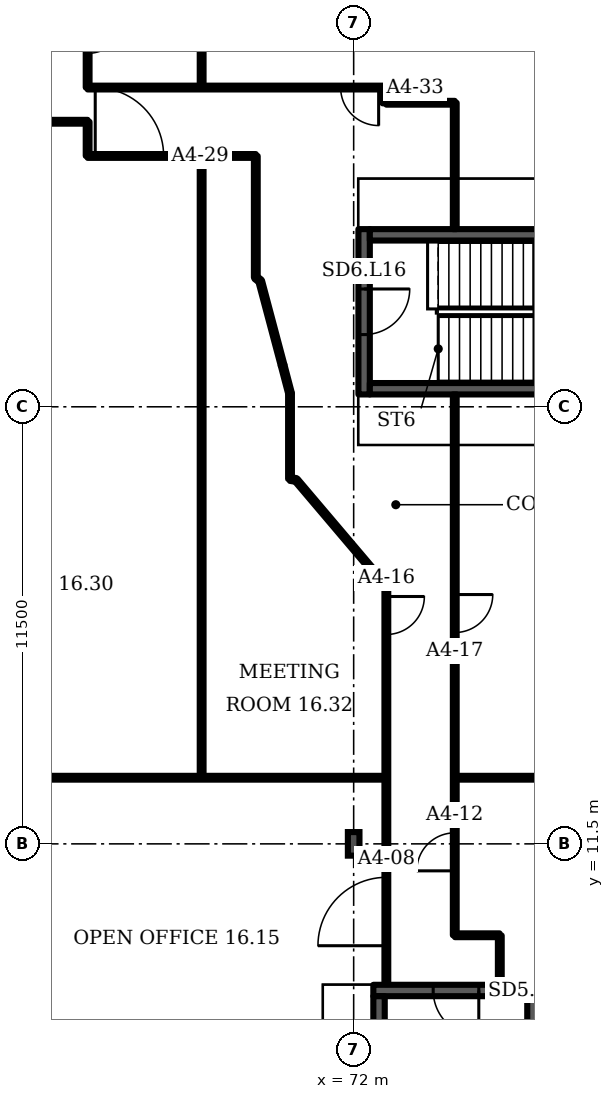
"""IFC4 building model, lengths in metres.
Left out: names, types, materials, properties, quantities, classifications, styles, units other than length and angle.
Written with IfcOpenShell. Run it as: python <this file> out.ifc"""

import sys

from ifc_helpers import new_model, si_unit, direction, frame, frame_2d, origin, origin_2d, place, context, subcontext, project, spatial, rectangle, i_section, extrude, element, fill, save


model = new_model("IFC4")
c1 = context("Model", 3, precision=1e-05, world=origin(), true_north=direction((0.0, 1.0)))
c2 = subcontext(c1, "Body", "Model", "MODEL_VIEW")
j1 = project(units=[si_unit("LENGTHUNIT", "METRE"), si_unit("PLANEANGLEUNIT", "RADIAN")], contexts=[c1])
p1 = place(None, origin())
s1 = spatial("IfcSite", under=j1, at=p1, CompositionType="ELEMENT")
p2 = place(p1, origin())
s2 = spatial("IfcBuilding", under=s1, at=p2, CompositionType="ELEMENT")
p3 = place(p2, frame((0.0, 0.0, 77.5)))
s3 = spatial("IfcBuildingStorey", under=s2, at=p3, CompositionType="ELEMENT", Elevation=77.5)
p4 = place(p3, frame((72.0, 11.5, 0.0), z_axis=(0.0, 0.0, 1.0), x_axis=(1.0, 0.0, 0.0)))
e1 = element("IfcColumn", 1, at=p4, inside=s3, PredefinedType="COLUMN", context=c2, shape_type="SweptSolid", body=[
    extrude(i_section(OverallWidth=0.305, OverallDepth=0.62, WebThickness=0.021, FlangeThickness=0.04, FilletRadius=0.027, at=origin_2d()), origin(), (0.0, 0.0, 1.0), 3.6),
])
p5 = place(p3, frame((72.518, 7.642, 0.0), z_axis=(0.0, 0.0, 1.0), x_axis=(1.0, 0.0, 0.0)))
e2 = element("IfcWall", 2, at=p5, inside=s3, PredefinedType="SHEAR", context=c2, shape_type="SweptSolid", body=[
    extrude(rectangle(XDim=4.35, YDim=0.3, at=frame_2d((2.175, 0.0))), origin(), (0.0, 0.0, 1.0), 3.2),
])
p6 = place(p5, frame((1.575, 0.0, 0.0)))
e3 = element("IfcOpeningElement", 3, at=p6, cuts=e2, PredefinedType="OPENING", context=c2, shape_type="SweptSolid", body=[
    extrude(rectangle(XDim=1.2, YDim=2.1, at=frame_2d((0.6, 1.05))), frame((0.0, 0.16, 0.0), z_axis=(0.0, -1.0, 0.0), x_axis=(1.0, 0.0, 0.0)), (0.0, 0.0, 1.0), 0.32),
])
p7 = place(p3, frame((72.275, 23.325, 0.0), z_axis=(0.0, 0.0, 1.0), x_axis=(0.0, 1.0, 0.0)))
e4 = element("IfcWall", 4, at=p7, inside=s3, PredefinedType="SHEAR", context=c2, shape_type="SweptSolid", body=[
    extrude(rectangle(XDim=4.35, YDim=0.3, at=frame_2d((2.175, 0.0))), origin(), (0.0, 0.0, 1.0), 3.2),
])
p8 = place(p7, frame((1.575, 0.0, 0.0)))
e5 = element("IfcOpeningElement", 5, at=p8, cuts=e4, PredefinedType="OPENING", context=c2, shape_type="SweptSolid", body=[
    extrude(rectangle(XDim=1.2, YDim=2.1, at=frame_2d((0.6, 1.05))), frame((0.0, 0.16, 0.0), z_axis=(0.0, -1.0, 0.0), x_axis=(1.0, 0.0, 0.0)), (0.0, 0.0, 1.0), 0.32),
])
p9 = place(p3, frame((45.3, 13.24, 0.0), z_axis=(0.0, 0.0, 1.0), x_axis=(1.0, 0.0, 0.0)))
e6 = element("IfcWall", 6, at=p9, inside=s3, PredefinedType="PARTITIONING", context=c2, shape_type="SweptSolid", body=[
    extrude(rectangle(XDim=27.56, YDim=0.1, at=frame_2d((13.78, 0.0))), origin(), (0.0, 0.0, 1.0), 3.2),
])
p10 = place(p3, frame((45.3, 30.5, 0.0), z_axis=(0.0, 0.0, 1.0), x_axis=(1.0, 0.0, 0.0)))
e7 = element("IfcWall", 7, at=p10, inside=s3, PredefinedType="PARTITIONING", context=c2, shape_type="SweptSolid", body=[
    extrude(rectangle(XDim=19.7, YDim=0.1, at=frame_2d((9.85, 0.0))), origin(), (0.0, 0.0, 1.0), 3.2),
])
p11 = place(p3, frame((65.0, 29.6, 0.0), z_axis=(0.0, 0.0, 1.0), x_axis=(0.0, 1.0, 0.0)))
e8 = element("IfcWall", 8, at=p11, inside=s3, PredefinedType="PARTITIONING", context=c2, shape_type="SweptSolid", body=[
    extrude(rectangle(XDim=0.9, YDim=0.1, at=frame_2d((0.45, 0.0))), origin(), (0.0, 0.0, 1.0), 3.2),
])
p12 = place(p3, frame((65.0, 29.6, 0.0), z_axis=(0.0, 0.0, 1.0), x_axis=(1.0, 0.0, 0.0)))
e9 = element("IfcWall", 9, at=p12, inside=s3, PredefinedType="PARTITIONING", context=c2, shape_type="SweptSolid", body=[
    extrude(rectangle(XDim=4.425, YDim=0.1, at=frame_2d((2.212, 0.0))), origin(), (0.0, 0.0, 1.0), 3.2),
])
p13 = place(p12, frame((0.2, 0.0, 0.0)))
e10 = element("IfcOpeningElement", 10, at=p13, cuts=e9, PredefinedType="OPENING", context=c2, shape_type="SweptSolid", body=[
    extrude(rectangle(XDim=1.8, YDim=2.1, at=frame_2d((0.9, 1.05))), frame((0.0, 0.06, 0.0), z_axis=(0.0, -1.0, 0.0), x_axis=(1.0, 0.0, 0.0)), (0.0, 0.0, 1.0), 0.12),
])
p14 = place(p3, frame((65.0, 31.4, 0.0), z_axis=(0.0, 0.0, 1.0), x_axis=(0.0, 1.0, 0.0)))
e11 = element("IfcWall", 11, at=p14, inside=s3, PredefinedType="PARTITIONING", context=c2, shape_type="SweptSolid", body=[
    extrude(rectangle(XDim=2.58, YDim=0.1, at=frame_2d((1.29, 0.0))), origin(), (0.0, 0.0, 1.0), 3.2),
])
p15 = place(p14, frame((0.9, 0.0, 0.0)))
e12 = element("IfcOpeningElement", 12, at=p15, cuts=e11, PredefinedType="OPENING", context=c2, shape_type="SweptSolid", body=[
    extrude(rectangle(XDim=1.0, YDim=2.1, at=frame_2d((0.5, 1.05))), frame((0.0, 0.06, 0.0), z_axis=(0.0, -1.0, 0.0), x_axis=(1.0, 0.0, 0.0)), (0.0, 0.0, 1.0), 0.12),
])
p16 = place(p3, frame((65.0, 31.4, 0.0), z_axis=(0.0, 0.0, 1.0), x_axis=(1.0, 0.0, 0.0)))
e13 = element("IfcWall", 13, at=p16, inside=s3, PredefinedType="PARTITIONING", context=c2, shape_type="SweptSolid", body=[
    extrude(rectangle(XDim=7.81, YDim=0.1, at=frame_2d((3.905, 0.0))), origin(), (0.0, 0.0, 1.0), 3.2),
])
p17 = place(p16, frame((6.657, 0.0, 0.0)))
e14 = element("IfcOpeningElement", 14, at=p17, cuts=e13, PredefinedType="OPENING", context=c2, shape_type="SweptSolid", body=[
    extrude(rectangle(XDim=1.0, YDim=2.1, at=frame_2d((0.5, 1.05))), frame((0.0, 0.06, 0.0), z_axis=(0.0, -1.0, 0.0), x_axis=(1.0, 0.0, 0.0)), (0.0, 0.0, 1.0), 0.12),
])
p18 = place(p3, frame((68.0, 13.24, 0.0), z_axis=(0.0, 0.0, 1.0), x_axis=(0.0, 1.0, 0.0)))
e15 = element("IfcWall", 15, at=p18, inside=s3, PredefinedType="PARTITIONING", context=c2, shape_type="SweptSolid", body=[
    extrude(rectangle(XDim=16.36, YDim=0.1, at=frame_2d((8.18, 0.0))), origin(), (0.0, 0.0, 1.0), 3.2),
])
p19 = place(p3, frame((68.0, 31.4, 0.0), z_axis=(0.0, 0.0, 1.0), x_axis=(0.0, 1.0, 0.0)))
e16 = element("IfcWall", 16, at=p19, inside=s3, PredefinedType="PARTITIONING", context=c2, shape_type="SweptSolid", body=[
    extrude(rectangle(XDim=8.39, YDim=0.1, at=frame_2d((4.195, 0.0))), origin(), (0.0, 0.0, 1.0), 3.2),
])
p20 = place(p3, frame((69.425, 26.4, 0.0), z_axis=(0.0, 0.0, 1.0), x_axis=(0.0, 1.0, 0.0)))
e17 = element("IfcWall", 17, at=p20, inside=s3, PredefinedType="PARTITIONING", context=c2, shape_type="SweptSolid", body=[
    extrude(rectangle(XDim=3.2, YDim=0.1, at=frame_2d((1.6, 0.0))), origin(), (0.0, 0.0, 1.0), 3.2),
])
p21 = place(p3, frame((69.54, 26.31, 0.0), z_axis=(0.0, 0.0, 1.0), x_axis=(-0.787997, 0.615675, 0.0)))
e18 = element("IfcWall", 18, at=p21, inside=s3, PredefinedType="PARTITIONING", context=c2, shape_type="SweptSolid", body=[
    extrude(rectangle(XDim=0.146, YDim=0.1, at=frame_2d((0.073, 0.0))), origin(), (0.0, 0.0, 1.0), 3.2),
])
p22 = place(p3, frame((70.13, 24.095, 0.0), z_axis=(0.0, 0.0, 1.0), x_axis=(-0.257318, 0.966327, 0.0)))
e19 = element("IfcWall", 19, at=p22, inside=s3, PredefinedType="PARTITIONING", context=c2, shape_type="SweptSolid", body=[
    extrude(rectangle(XDim=2.292, YDim=0.1, at=frame_2d((1.146, 0.0))), origin(), (0.0, 0.0, 1.0), 3.2),
])
p23 = place(p3, frame((70.325, 21.1, 0.0), z_axis=(0.0, 0.0, 1.0), x_axis=(0.0, 1.0, 0.0)))
e20 = element("IfcWall", 20, at=p23, inside=s3, PredefinedType="PARTITIONING", context=c2, shape_type="SweptSolid", body=[
    extrude(rectangle(XDim=2.255, YDim=0.1, at=frame_2d((1.127, 0.0))), origin(), (0.0, 0.0, 1.0), 3.2),
])
p24 = place(p3, frame((70.325, 23.355, 0.0), z_axis=(0.0, 0.0, 1.0), x_axis=(-0.254901, 0.966965, 0.0)))
e21 = element("IfcWall", 21, at=p24, inside=s3, PredefinedType="PARTITIONING", context=c2, shape_type="SweptSolid", body=[
    extrude(rectangle(XDim=0.765, YDim=0.1, at=frame_2d((0.383, 0.0))), origin(), (0.0, 0.0, 1.0), 3.2),
])
p25 = place(p3, frame((70.485, 21.075, 0.0), z_axis=(0.0, 0.0, 1.0), x_axis=(-0.987098, 0.160112, 0.0)))
e22 = element("IfcWall", 22, at=p25, inside=s3, PredefinedType="PARTITIONING", context=c2, shape_type="SweptSolid", body=[
    extrude(rectangle(XDim=0.157, YDim=0.1, at=frame_2d((0.079, 0.0))), origin(), (0.0, 0.0, 1.0), 3.2),
])
p26 = place(p3, frame((72.81, 30.985, 0.0), z_axis=(0.0, 0.0, 1.0), x_axis=(0.0, 1.0, 0.0)))
e23 = element("IfcWall", 23, at=p26, inside=s3, PredefinedType="PARTITIONING", context=c2, shape_type="SweptSolid", body=[
    extrude(rectangle(XDim=0.415, YDim=0.1, at=frame_2d((0.208, 0.0))), origin(), (0.0, 0.0, 1.0), 3.2),
])
p27 = place(p3, frame((72.86, 7.812, 0.0), z_axis=(0.0, 0.0, 1.0), x_axis=(0.0, 1.0, 0.0)))
e24 = element("IfcWall", 24, at=p27, inside=s3, PredefinedType="PARTITIONING", context=c2, shape_type="SweptSolid", body=[
    extrude(rectangle(XDim=10.463, YDim=0.1, at=frame_2d((5.231, 0.0))), origin(), (0.0, 0.0, 1.0), 3.2),
])
p28 = place(p27, frame((1.008, 0.0, 0.0)))
e25 = element("IfcOpeningElement", 25, at=p28, cuts=e24, PredefinedType="OPENING", context=c2, shape_type="SweptSolid", body=[
    extrude(rectangle(XDim=1.8, YDim=2.1, at=frame_2d((0.9, 1.05))), frame((0.0, 0.06, 0.0), z_axis=(0.0, -1.0, 0.0), x_axis=(1.0, 0.0, 0.0)), (0.0, 0.0, 1.0), 0.12),
])
p29 = place(p27, frame((9.197, 0.0, 0.0)))
e26 = element("IfcOpeningElement", 26, at=p29, cuts=e24, PredefinedType="OPENING", context=c2, shape_type="SweptSolid", body=[
    extrude(rectangle(XDim=1.0, YDim=2.1, at=frame_2d((0.5, 1.05))), frame((0.0, 0.06, 0.0), z_axis=(0.0, -1.0, 0.0), x_axis=(1.0, 0.0, 0.0)), (0.0, 0.0, 1.0), 0.12),
])
p30 = place(p3, frame((72.86, 31.0, 0.0), z_axis=(0.0, 0.0, 1.0), x_axis=(1.0, 0.0, 0.0)))
e27 = element("IfcWall", 27, at=p30, inside=s3, PredefinedType="PARTITIONING", context=c2, shape_type="SweptSolid", body=[
    extrude(rectangle(XDim=1.8, YDim=0.1, at=frame_2d((0.9, 0.0))), origin(), (0.0, 0.0, 1.0), 3.2),
])
p31 = place(p3, frame((72.86, 18.275, 0.0), z_axis=(0.0, 0.0, 1.0), x_axis=(-0.646848, 0.762613, 0.0)))
e28 = element("IfcWall", 28, at=p31, inside=s3, PredefinedType="PARTITIONING", context=c2, shape_type="SweptSolid", body=[
    extrude(rectangle(XDim=3.672, YDim=0.1, at=frame_2d((1.836, 0.0))), origin(), (0.0, 0.0, 1.0), 3.2),
])
p32 = place(p3, frame((74.66, 9.095, 0.0), z_axis=(0.0, 0.0, 1.0), x_axis=(0.0, 1.0, 0.0)))
e29 = element("IfcWall", 29, at=p32, inside=s3, PredefinedType="PARTITIONING", context=c2, shape_type="SweptSolid", body=[
    extrude(rectangle(XDim=14.23, YDim=0.1, at=frame_2d((7.115, 0.0))), origin(), (0.0, 0.0, 1.0), 3.2),
])
p33 = place(p32, frame((1.695, 0.0, 0.0)))
e30 = element("IfcOpeningElement", 30, at=p33, cuts=e29, PredefinedType="OPENING", context=c2, shape_type="SweptSolid", body=[
    extrude(rectangle(XDim=1.0, YDim=2.1, at=frame_2d((0.5, 1.05))), frame((0.0, 0.06, 0.0), z_axis=(0.0, -1.0, 0.0), x_axis=(1.0, 0.0, 0.0)), (0.0, 0.0, 1.0), 0.12),
])
p34 = place(p32, frame((7.965, 0.0, 0.0)))
e31 = element("IfcOpeningElement", 31, at=p34, cuts=e29, PredefinedType="OPENING", context=c2, shape_type="SweptSolid", body=[
    extrude(rectangle(XDim=1.0, YDim=2.1, at=frame_2d((0.5, 1.05))), frame((0.0, 0.06, 0.0), z_axis=(0.0, -1.0, 0.0), x_axis=(1.0, 0.0, 0.0)), (0.0, 0.0, 1.0), 0.12),
])
p35 = place(p3, frame((74.66, 27.675, 0.0), z_axis=(0.0, 0.0, 1.0), x_axis=(0.0, 1.0, 0.0)))
e32 = element("IfcWall", 32, at=p35, inside=s3, PredefinedType="PARTITIONING", context=c2, shape_type="SweptSolid", body=[
    extrude(rectangle(XDim=3.325, YDim=0.1, at=frame_2d((1.663, 0.0))), origin(), (0.0, 0.0, 1.0), 3.2),
])
p36 = place(p3, frame((74.665, 9.095, 0.0), z_axis=(0.0, 0.0, 1.0), x_axis=(1.0, 0.0, 0.0)))
e33 = element("IfcWall", 33, at=p36, inside=s3, PredefinedType="PARTITIONING", context=c2, shape_type="SweptSolid", body=[
    extrude(rectangle(XDim=1.175, YDim=0.1, at=frame_2d((0.587, 0.0))), origin(), (0.0, 0.0, 1.0), 3.2),
])
p37 = place(p3, frame((74.665, 13.24, 0.0), z_axis=(0.0, 0.0, 1.0), x_axis=(1.0, 0.0, 0.0)))
e34 = element("IfcWall", 34, at=p37, inside=s3, PredefinedType="PARTITIONING", context=c2, shape_type="SweptSolid", body=[
    extrude(rectangle(XDim=11.7, YDim=0.1, at=frame_2d((5.85, 0.0))), origin(), (0.0, 0.0, 1.0), 3.2),
])
p38 = place(p3, frame((75.845, 7.812, 0.0), z_axis=(0.0, 0.0, 1.0), x_axis=(0.0, 1.0, 0.0)))
e35 = element("IfcWall", 35, at=p38, inside=s3, PredefinedType="PARTITIONING", context=c2, shape_type="SweptSolid", body=[
    extrude(rectangle(XDim=1.278, YDim=0.1, at=frame_2d((0.639, 0.0))), origin(), (0.0, 0.0, 1.0), 3.2),
])
for number, where, z_axis, x_axis in (
    (36, (72.667, -0.008, 0.0), (0.0, 0.0, 1.0), (0.0, 1.0, 0.0)),
    (37, (76.718, -0.008, 0.0), (0.0, 0.0, 1.0), (0.0, 1.0, 0.0)),
    (38, (72.425, 23.475, 0.0), (0.0, 0.0, 1.0), (1.0, 0.0, 0.0)),
    (39, (72.425, 27.525, 0.0), (0.0, 0.0, 1.0), (1.0, 0.0, 0.0)),
):
    element("IfcWall", number, at=place(p3, frame(where, z_axis=z_axis, x_axis=x_axis)), inside=s3, PredefinedType="SHEAR", context=c2, shape_type="SweptSolid", body=[
        extrude(rectangle(XDim=7.5, YDim=0.3, at=frame_2d((3.75, 0.0))), origin(), (0.0, 0.0, 1.0), 3.2),
    ])
p39 = place(p6, origin())
e40 = element("IfcDoor", 40, at=p39, inside=s3, OperationType="SINGLE_SWING_RIGHT", PredefinedType="DOOR", context=c2, shape_type="SweptSolid", body=[
    extrude(rectangle(XDim=1.2, YDim=2.1, at=frame_2d((0.6, 1.05))), frame((0.0, 0.025, 0.0), z_axis=(0.0, -1.0, 0.0), x_axis=(1.0, 0.0, 0.0)), (0.0, 0.0, 1.0), 0.05),
])
fill(e3, e40)
p40 = place(p8, origin())
e41 = element("IfcDoor", 41, at=p40, inside=s3, OperationType="SINGLE_SWING_RIGHT", PredefinedType="DOOR", context=c2, shape_type="SweptSolid", body=[
    extrude(rectangle(XDim=1.2, YDim=2.1, at=frame_2d((0.6, 1.05))), frame((0.0, 0.025, 0.0), z_axis=(0.0, -1.0, 0.0), x_axis=(1.0, 0.0, 0.0)), (0.0, 0.0, 1.0), 0.05),
])
fill(e5, e41)
p41 = place(p28, origin())
e42 = element("IfcDoor", 42, at=p41, inside=s3, OperationType="DOUBLE_DOOR_SINGLE_SWING", PredefinedType="DOOR", context=c2, shape_type="SweptSolid", body=[
    extrude(rectangle(XDim=1.8, YDim=2.1, at=frame_2d((0.9, 1.05))), frame((0.0, 0.025, 0.0), z_axis=(0.0, -1.0, 0.0), x_axis=(1.0, 0.0, 0.0)), (0.0, 0.0, 1.0), 0.05),
])
fill(e25, e42)
p42 = place(p33, origin())
e43 = element("IfcDoor", 43, at=p42, inside=s3, OperationType="SINGLE_SWING_LEFT", PredefinedType="DOOR", context=c2, shape_type="SweptSolid", body=[
    extrude(rectangle(XDim=1.0, YDim=2.1, at=frame_2d((0.5, 1.05))), frame((0.0, 0.025, 0.0), z_axis=(0.0, -1.0, 0.0), x_axis=(1.0, 0.0, 0.0)), (0.0, 0.0, 1.0), 0.05),
])
fill(e30, e43)
p43 = place(p29, origin())
e44 = element("IfcDoor", 44, at=p43, inside=s3, OperationType="SINGLE_SWING_RIGHT", PredefinedType="DOOR", context=c2, shape_type="SweptSolid", body=[
    extrude(rectangle(XDim=1.0, YDim=2.1, at=frame_2d((0.5, 1.05))), frame((0.0, 0.025, 0.0), z_axis=(0.0, -1.0, 0.0), x_axis=(1.0, 0.0, 0.0)), (0.0, 0.0, 1.0), 0.05),
])
fill(e26, e44)
p44 = place(p34, origin())
e45 = element("IfcDoor", 45, at=p44, inside=s3, OperationType="SINGLE_SWING_RIGHT", PredefinedType="DOOR", context=c2, shape_type="SweptSolid", body=[
    extrude(rectangle(XDim=1.0, YDim=2.1, at=frame_2d((0.5, 1.05))), frame((0.0, 0.025, 0.0), z_axis=(0.0, -1.0, 0.0), x_axis=(1.0, 0.0, 0.0)), (0.0, 0.0, 1.0), 0.05),
])
fill(e31, e45)
p45 = place(p13, origin())
e46 = element("IfcDoor", 46, at=p45, inside=s3, OperationType="DOUBLE_DOOR_SINGLE_SWING", PredefinedType="DOOR", context=c2, shape_type="SweptSolid", body=[
    extrude(rectangle(XDim=1.8, YDim=2.1, at=frame_2d((0.9, 1.05))), frame((0.0, 0.025, 0.0), z_axis=(0.0, -1.0, 0.0), x_axis=(1.0, 0.0, 0.0)), (0.0, 0.0, 1.0), 0.05),
])
fill(e10, e46)
p46 = place(p17, origin())
e47 = element("IfcDoor", 47, at=p46, inside=s3, OperationType="SINGLE_SWING_RIGHT", PredefinedType="DOOR", context=c2, shape_type="SweptSolid", body=[
    extrude(rectangle(XDim=1.0, YDim=2.1, at=frame_2d((0.5, 1.05))), frame((0.0, 0.025, 0.0), z_axis=(0.0, -1.0, 0.0), x_axis=(1.0, 0.0, 0.0)), (0.0, 0.0, 1.0), 0.05),
])
fill(e14, e47)
p47 = place(p15, origin())
e48 = element("IfcDoor", 48, at=p47, inside=s3, OperationType="SINGLE_SWING_RIGHT", PredefinedType="DOOR", context=c2, shape_type="SweptSolid", body=[
    extrude(rectangle(XDim=1.0, YDim=2.1, at=frame_2d((0.5, 1.05))), frame((0.0, 0.025, 0.0), z_axis=(0.0, -1.0, 0.0), x_axis=(1.0, 0.0, 0.0)), (0.0, 0.0, 1.0), 0.05),
])
fill(e12, e48)
save(model, sys.argv[1])
